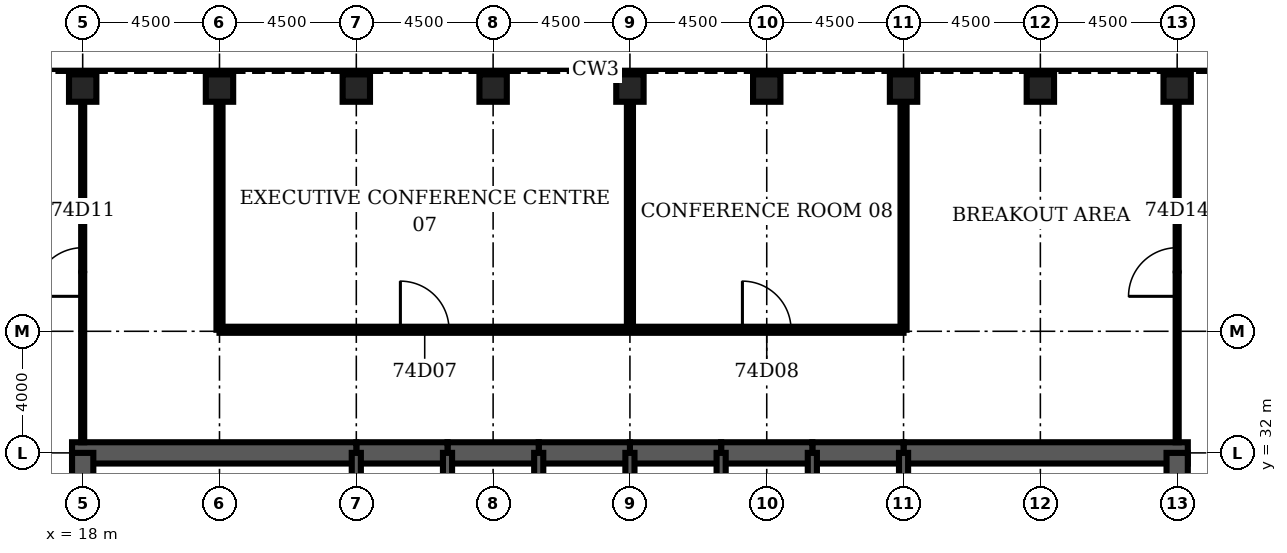
"""IFC4 building model, lengths in metres.
Left out: names, types, materials, properties, quantities, classifications, styles, units other than length and angle.
Written with IfcOpenShell. Run it as: python <this file> out.ifc"""

import sys

from ifc_helpers import new_model, si_unit, direction, frame, frame_2d, origin, origin_2d, place, context, subcontext, project, spatial, rectangle, hollow_rectangle, extrude, element, fill, save


model = new_model("IFC4")
c1 = context("Model", 3, precision=1e-05, world=origin(), true_north=direction((0.0, 1.0)))
c2 = subcontext(c1, "Body", "Model", "MODEL_VIEW")
j1 = project(units=[si_unit("LENGTHUNIT", "METRE"), si_unit("PLANEANGLEUNIT", "RADIAN")], contexts=[c1])
p1 = place(None, origin())
s1 = spatial("IfcSite", under=j1, at=p1, CompositionType="ELEMENT")
p2 = place(p1, origin())
s2 = spatial("IfcBuilding", under=s1, at=p2, CompositionType="ELEMENT")
p3 = place(p2, frame((0.0, 0.0, 325.7)))
s3 = spatial("IfcBuildingStorey", under=s2, at=p3, CompositionType="ELEMENT", Elevation=325.7)
for number, where, z_axis, x_axis in (
    (1, (54.0, 44.0, 0.0), (0.0, 0.0, 1.0), (0.0, 1.0, 0.0)),
    (2, (49.5, 44.0, 0.0), (0.0, 0.0, 1.0), (0.0, 1.0, 0.0)),
    (3, (45.0, 44.0, 0.0), (0.0, 0.0, 1.0), (0.0, 1.0, 0.0)),
    (4, (40.5, 44.0, 0.0), (0.0, 0.0, 1.0), (0.0, 1.0, 0.0)),
    (5, (36.0, 44.0, 0.0), (0.0, 0.0, 1.0), (0.0, 1.0, 0.0)),
    (6, (31.5, 44.0, 0.0), (0.0, 0.0, 1.0), (0.0, 1.0, 0.0)),
    (7, (27.0, 44.0, 0.0), (0.0, 0.0, 1.0), (0.0, 1.0, 0.0)),
    (8, (22.5, 44.0, 0.0), (0.0, 0.0, 1.0), (0.0, 1.0, 0.0)),
    (9, (18.0, 44.0, 0.0), (0.0, 0.0, 1.0), (0.0, 1.0, 0.0)),
):
    element("IfcColumn", number, at=place(p3, frame(where, z_axis=z_axis, x_axis=x_axis)), inside=s3, PredefinedType="COLUMN", context=c2, shape_type="SweptSolid", body=[
        extrude(hollow_rectangle(XDim=0.9, YDim=0.9, WallThickness=0.05, at=origin_2d()), origin(), (0.0, 0.0, 1.0), 4.2),
    ])
p4 = place(p3, frame((54.35, 32.0, 0.0), z_axis=(0.0, 0.0, 1.0), x_axis=(-1.0, 0.0, 0.0)))
e10 = element("IfcWall", 10, at=p4, inside=s3, PredefinedType="SHEAR", context=c2, shape_type="SweptSolid", body=[
    extrude(rectangle(XDim=9.35, YDim=0.7, at=frame_2d((4.675, 0.0))), origin(), (0.0, 0.0, 1.0), 4.2),
])
for number, where, z_axis, x_axis in (
    (11, (45.0, 32.0, 0.0), (0.0, 0.0, 1.0), (-1.0, 0.0, 0.0)),
    (12, (42.0, 32.0, 0.0), (0.0, 0.0, 1.0), (-1.0, 0.0, 0.0)),
    (13, (39.0, 32.0, 0.0), (0.0, 0.0, 1.0), (-1.0, 0.0, 0.0)),
    (14, (36.0, 32.0, 0.0), (0.0, 0.0, 1.0), (-1.0, 0.0, 0.0)),
    (15, (33.0, 32.0, 0.0), (0.0, 0.0, 1.0), (-1.0, 0.0, 0.0)),
    (16, (30.0, 32.0, 0.0), (0.0, 0.0, 1.0), (-1.0, 0.0, 0.0)),
):
    element("IfcWall", number, at=place(p3, frame(where, z_axis=z_axis, x_axis=x_axis)), inside=s3, PredefinedType="SHEAR", context=c2, shape_type="SweptSolid", body=[
        extrude(rectangle(XDim=3.0, YDim=0.7, at=frame_2d((1.5, 0.0))), origin(), (0.0, 0.0, 1.0), 4.2),
    ])
p5 = place(p3, frame((27.0, 32.0, 0.0), z_axis=(0.0, 0.0, 1.0), x_axis=(-1.0, 0.0, 0.0)))
e17 = element("IfcWall", 17, at=p5, inside=s3, PredefinedType="SHEAR", context=c2, shape_type="SweptSolid", body=[
    extrude(rectangle(XDim=9.35, YDim=0.7, at=frame_2d((4.675, 0.0))), origin(), (0.0, 0.0, 1.0), 4.2),
])
for number, where, z_axis, x_axis in (
    (18, (18.0, 32.0, 0.0), (0.0, 0.0, 1.0), (0.0, -1.0, 0.0)),
    (19, (54.0, 28.8, 0.0), (0.0, 0.0, 1.0), (0.0, 1.0, 0.0)),
):
    element("IfcWall", number, at=place(p3, frame(where, z_axis=z_axis, x_axis=x_axis)), inside=s3, PredefinedType="SHEAR", context=c2, shape_type="SweptSolid", body=[
        extrude(rectangle(XDim=3.2, YDim=0.7, at=frame_2d((1.6, 0.0))), origin(), (0.0, 0.0, 1.0), 4.2),
    ])
for number, where, z_axis, x_axis in (
    (20, (27.0, 28.8, 0.0), (0.0, 0.0, 1.0), (0.0, 1.0, 0.0)),
    (21, (30.0, 28.8, 0.0), (0.0, 0.0, 1.0), (0.0, 1.0, 0.0)),
    (22, (33.0, 28.8, 0.0), (0.0, 0.0, 1.0), (0.0, 1.0, 0.0)),
    (23, (36.0, 28.8, 0.0), (0.0, 0.0, 1.0), (0.0, 1.0, 0.0)),
    (24, (39.0, 28.8, 0.0), (0.0, 0.0, 1.0), (0.0, 1.0, 0.0)),
    (25, (42.0, 28.8, 0.0), (0.0, 0.0, 1.0), (0.0, 1.0, 0.0)),
    (26, (45.0, 28.8, 0.0), (0.0, 0.0, 1.0), (0.0, 1.0, 0.0)),
):
    element("IfcWall", number, at=place(p3, frame(where, z_axis=z_axis, x_axis=x_axis)), inside=s3, PredefinedType="SOLIDWALL", context=c2, shape_type="SweptSolid", body=[
        extrude(rectangle(XDim=3.2, YDim=0.3, at=frame_2d((1.6, 0.0))), origin(), (0.0, 0.0, 1.0), 4.2),
    ])
p6 = place(p3, frame((22.5, 36.05, 0.0), z_axis=(0.0, 0.0, 1.0), x_axis=(1.0, 0.0, 0.0)))
e27 = element("IfcWall", 27, at=p6, inside=s3, PredefinedType="PARTITIONING", context=c2, shape_type="SweptSolid", body=[
    extrude(rectangle(XDim=22.5, YDim=0.2, at=frame_2d((11.25, 0.0))), origin(), (0.0, 0.0, 1.0), 3.0),
])
p7 = place(p6, frame((5.95, 0.0, 0.0)))
e28 = element("IfcOpeningElement", 28, at=p7, cuts=e27, PredefinedType="OPENING", context=c2, shape_type="SweptSolid", body=[
    extrude(rectangle(XDim=1.6, YDim=2.1, at=frame_2d((0.8, 1.05))), frame((0.0, 0.11, 0.0), z_axis=(0.0, -1.0, 0.0), x_axis=(1.0, 0.0, 0.0)), (0.0, 0.0, 1.0), 0.22),
])
p8 = place(p6, frame((17.2, 0.0, 0.0)))
e29 = element("IfcOpeningElement", 29, at=p8, cuts=e27, PredefinedType="OPENING", context=c2, shape_type="SweptSolid", body=[
    extrude(rectangle(XDim=1.6, YDim=2.1, at=frame_2d((0.8, 1.05))), frame((0.0, 0.11, 0.0), z_axis=(0.0, -1.0, 0.0), x_axis=(1.0, 0.0, 0.0)), (0.0, 0.0, 1.0), 0.22),
])
p9 = place(p3, frame((18.0, 32.35, 0.0), z_axis=(0.0, 0.0, 1.0), x_axis=(0.0, 1.0, 0.0)))
e30 = element("IfcWall", 30, at=p9, inside=s3, PredefinedType="PARTITIONING", context=c2, shape_type="SweptSolid", body=[
    extrude(rectangle(XDim=11.2, YDim=0.1, at=frame_2d((5.6, 0.0))), origin(), (0.0, 0.0, 1.0), 3.0),
])
p10 = place(p9, frame((4.8, 0.0, 0.0)))
e31 = element("IfcOpeningElement", 31, at=p10, cuts=e30, PredefinedType="OPENING", context=c2, shape_type="SweptSolid", body=[
    extrude(rectangle(XDim=1.6, YDim=2.1, at=frame_2d((0.8, 1.05))), frame((0.0, 0.06, 0.0), z_axis=(0.0, -1.0, 0.0), x_axis=(1.0, 0.0, 0.0)), (0.0, 0.0, 1.0), 0.12),
])
for number, where, z_axis, x_axis in (
    (32, (22.5, 36.05, 0.0), (0.0, 0.0, 1.0), (0.0, 1.0, 0.0)),
    (33, (36.0, 36.05, 0.0), (0.0, 0.0, 1.0), (0.0, 1.0, 0.0)),
    (34, (45.0, 36.05, 0.0), (0.0, 0.0, 1.0), (0.0, 1.0, 0.0)),
):
    element("IfcWall", number, at=place(p3, frame(where, z_axis=z_axis, x_axis=x_axis)), inside=s3, PredefinedType="PARTITIONING", context=c2, shape_type="SweptSolid", body=[
        extrude(rectangle(XDim=7.5, YDim=0.2, at=frame_2d((3.75, 0.0))), origin(), (0.0, 0.0, 1.0), 3.0),
    ])
p11 = place(p3, frame((54.0, 32.35, 0.0), z_axis=(0.0, 0.0, 1.0), x_axis=(0.0, 1.0, 0.0)))
e35 = element("IfcWall", 35, at=p11, inside=s3, PredefinedType="PARTITIONING", context=c2, shape_type="SweptSolid", body=[
    extrude(rectangle(XDim=11.2, YDim=0.1, at=frame_2d((5.6, 0.0))), origin(), (0.0, 0.0, 1.0), 3.0),
])
p12 = place(p11, frame((4.8, 0.0, 0.0)))
e36 = element("IfcOpeningElement", 36, at=p12, cuts=e35, PredefinedType="OPENING", context=c2, shape_type="SweptSolid", body=[
    extrude(rectangle(XDim=1.6, YDim=2.1, at=frame_2d((0.8, 1.05))), frame((0.0, 0.06, 0.0), z_axis=(0.0, -1.0, 0.0), x_axis=(1.0, 0.0, 0.0)), (0.0, 0.0, 1.0), 0.12),
])
p13 = place(p7, origin())
e37 = element("IfcDoor", 37, at=p13, inside=s3, OperationType="SINGLE_SWING_LEFT", PredefinedType="DOOR", context=c2, shape_type="SweptSolid", body=[
    extrude(rectangle(XDim=1.6, YDim=2.1, at=frame_2d((0.8, 1.05))), frame((0.0, 0.025, 0.0), z_axis=(0.0, -1.0, 0.0), x_axis=(1.0, 0.0, 0.0)), (0.0, 0.0, 1.0), 0.05),
])
fill(e28, e37)
p14 = place(p8, origin())
e38 = element("IfcDoor", 38, at=p14, inside=s3, OperationType="SINGLE_SWING_LEFT", PredefinedType="DOOR", context=c2, shape_type="SweptSolid", body=[
    extrude(rectangle(XDim=1.6, YDim=2.1, at=frame_2d((0.8, 1.05))), frame((0.0, 0.025, 0.0), z_axis=(0.0, -1.0, 0.0), x_axis=(1.0, 0.0, 0.0)), (0.0, 0.0, 1.0), 0.05),
])
fill(e29, e38)
p15 = place(p10, origin())
e39 = element("IfcDoor", 39, at=p15, inside=s3, OperationType="SINGLE_SWING_LEFT", PredefinedType="DOOR", context=c2, shape_type="SweptSolid", body=[
    extrude(rectangle(XDim=1.6, YDim=2.1, at=frame_2d((0.8, 1.05))), frame((0.0, 0.025, 0.0), z_axis=(0.0, -1.0, 0.0), x_axis=(1.0, 0.0, 0.0)), (0.0, 0.0, 1.0), 0.05),
])
fill(e31, e39)
p16 = place(p12, origin())
e40 = element("IfcDoor", 40, at=p16, inside=s3, OperationType="SINGLE_SWING_LEFT", PredefinedType="DOOR", context=c2, shape_type="SweptSolid", body=[
    extrude(rectangle(XDim=1.6, YDim=2.1, at=frame_2d((0.8, 1.05))), frame((0.0, 0.025, 0.0), z_axis=(0.0, -1.0, 0.0), x_axis=(1.0, 0.0, 0.0)), (0.0, 0.0, 1.0), 0.05),
])
fill(e36, e40)
save(model, sys.argv[1])
